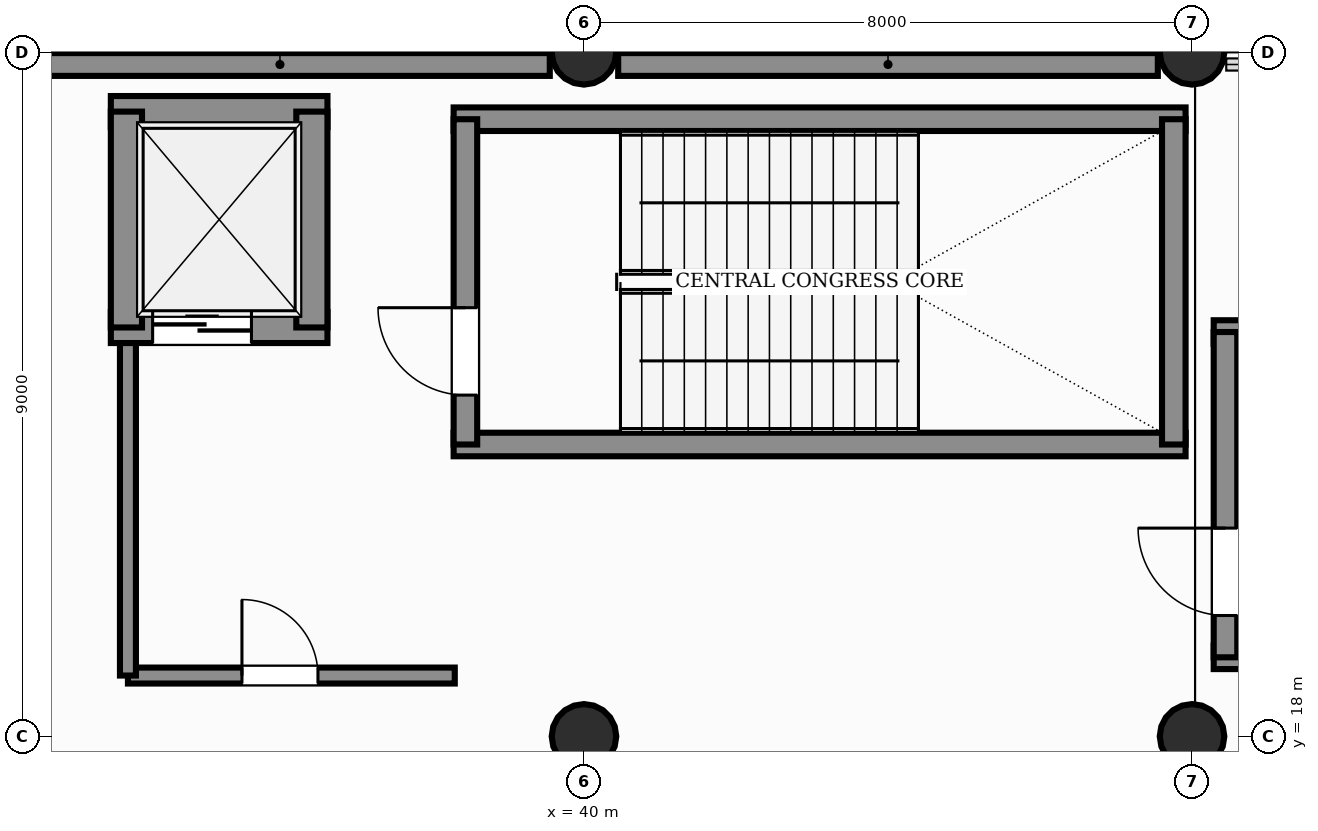
"""IFC4 building model, lengths in metres.
Left out: names, types, materials, properties, quantities, classifications, styles, units other than length and angle.
Written with IfcOpenShell. Run it as: python <this file> out.ifc"""

import sys

from ifc_helpers import new_model, si_unit, direction, frame, frame_2d, origin, origin_2d, place, context, subcontext, project, spatial, rectangle, circle, extrude, element, fill, save


model = new_model("IFC4")
c1 = context("Model", 3, precision=1e-05, world=origin(), true_north=direction((0.0, 1.0)))
c2 = subcontext(c1, "Body", "Model", "MODEL_VIEW")
j1 = project(units=[si_unit("LENGTHUNIT", "METRE"), si_unit("PLANEANGLEUNIT", "RADIAN")], contexts=[c1])
p1 = place(None, origin())
s1 = spatial("IfcSite", under=j1, at=p1, CompositionType="ELEMENT")
p2 = place(p1, origin())
s2 = spatial("IfcBuilding", under=s1, at=p2, CompositionType="ELEMENT")
p3 = place(p2, frame((0.0, 0.0, 6.0)))
s3 = spatial("IfcBuildingStorey", under=s2, at=p3, CompositionType="ELEMENT", Elevation=6.0)
for number, where, z_axis, x_axis in (
    (1, (40.0, 18.0, 0.0), (0.0, 0.0, 1.0), (1.0, 0.0, 0.0)),
    (2, (40.0, 27.0, 0.0), (0.0, 0.0, 1.0), (1.0, 0.0, 0.0)),
    (3, (48.0, 18.0, 0.0), (0.0, 0.0, 1.0), (1.0, 0.0, 0.0)),
    (4, (48.0, 27.0, 0.0), (0.0, 0.0, 1.0), (1.0, 0.0, 0.0)),
):
    element("IfcColumn", number, at=place(p3, frame(where, z_axis=z_axis, x_axis=x_axis)), inside=s3, PredefinedType="COLUMN", context=c2, shape_type="SweptSolid", body=[
        extrude(circle(Radius=0.425, at=origin_2d()), origin(), (0.0, 0.0, 1.0), 5.4),
    ])
for number, where, z_axis, x_axis in (
    (5, (32.45, 26.84, 0.0), (0.0, 0.0, 1.0), (1.0, 0.0, 0.0)),
    (6, (40.45, 26.84, 0.0), (0.0, 0.0, 1.0), (1.0, 0.0, 0.0)),
):
    element("IfcWall", number, at=place(p3, frame(where, z_axis=z_axis, x_axis=x_axis)), inside=s3, PredefinedType="SOLIDWALL", context=c2, shape_type="SweptSolid", body=[
        extrude(rectangle(XDim=7.1, YDim=0.3, at=frame_2d((3.55, 0.0))), origin(), (0.0, 0.0, 1.0), 4.18),
    ])
for number, where, z_axis, x_axis in (
    (7, (38.285, 21.84, 0.0), (0.0, 0.0, 1.0), (1.0, 0.0, 0.0)),
    (8, (38.285, 26.12, 0.0), (0.0, 0.0, 1.0), (1.0, 0.0, 0.0)),
):
    element("IfcWall", number, at=place(p3, frame(where, z_axis=z_axis, x_axis=x_axis)), inside=s3, PredefinedType="SHEAR", context=c2, shape_type="SweptSolid", body=[
        extrude(rectangle(XDim=9.63, YDim=0.31, at=frame_2d((4.815, 0.0))), origin(), (0.0, 0.0, 1.0), 5.4),
    ])
p4 = place(p3, frame((38.44, 21.84, 0.0), z_axis=(0.0, 0.0, 1.0), x_axis=(0.0, 1.0, 0.0)))
e9 = element("IfcWall", 9, at=p4, inside=s3, PredefinedType="SHEAR", context=c2, shape_type="SweptSolid", body=[
    extrude(rectangle(XDim=4.28, YDim=0.31, at=frame_2d((2.14, 0.0))), origin(), (0.0, 0.0, 1.0), 5.4),
])
p5 = place(p4, frame((0.65, 0.0, 0.0)))
e10 = element("IfcOpeningElement", 10, at=p5, cuts=e9, PredefinedType="OPENING", context=c2, shape_type="SweptSolid", body=[
    extrude(rectangle(XDim=1.15, YDim=2.2, at=frame_2d((0.575, 1.1))), frame((0.0, 0.165, 0.0), z_axis=(0.0, -1.0, 0.0), x_axis=(1.0, 0.0, 0.0)), (0.0, 0.0, 1.0), 0.33),
])
p6 = place(p3, frame((47.76, 21.84, 0.0), z_axis=(0.0, 0.0, 1.0), x_axis=(0.0, 1.0, 0.0)))
e11 = element("IfcWall", 11, at=p6, inside=s3, PredefinedType="SHEAR", context=c2, shape_type="SweptSolid", body=[
    extrude(rectangle(XDim=4.28, YDim=0.31, at=frame_2d((2.14, 0.0))), origin(), (0.0, 0.0, 1.0), 5.4),
])
p7 = place(p3, frame((34.0, 18.8, 0.0), z_axis=(0.0, 0.0, 1.0), x_axis=(1.0, 0.0, 0.0)))
e12 = element("IfcWall", 12, at=p7, inside=s3, PredefinedType="PARTITIONING", context=c2, shape_type="SweptSolid", body=[
    extrude(rectangle(XDim=4.3, YDim=0.21, at=frame_2d((2.15, 0.0))), origin(), (0.0, 0.0, 1.0), 3.85),
])
p8 = place(p7, frame((1.5, 0.0, 0.0)))
e13 = element("IfcOpeningElement", 13, at=p8, cuts=e12, PredefinedType="OPENING", context=c2, shape_type="SweptSolid", body=[
    extrude(rectangle(XDim=1.0, YDim=2.15, at=frame_2d((0.5, 1.075))), frame((0.0, 0.115, 0.0), z_axis=(0.0, -1.0, 0.0), x_axis=(1.0, 0.0, 0.0)), (0.0, 0.0, 1.0), 0.23),
])
p9 = place(p3, frame((34.0, 18.8, 0.0), z_axis=(0.0, 0.0, 1.0), x_axis=(0.0, 1.0, 0.0)))
e14 = element("IfcWall", 14, at=p9, inside=s3, PredefinedType="PARTITIONING", context=c2, shape_type="SweptSolid", body=[
    extrude(rectangle(XDim=4.6, YDim=0.21, at=frame_2d((2.3, 0.0))), origin(), (0.0, 0.0, 1.0), 3.85),
])
p10 = place(p3, frame((33.775, 23.38, 0.0), z_axis=(0.0, 0.0, 1.0), x_axis=(1.0, 0.0, 0.0)))
e15 = element("IfcWall", 15, at=p10, inside=s3, PredefinedType="SHEAR", context=c2, shape_type="SweptSolid", body=[
    extrude(rectangle(XDim=2.85, YDim=0.41, at=frame_2d((1.425, 0.0))), origin(), (0.0, 0.0, 1.0), 5.4),
])
p11 = place(p10, frame((0.55, 0.0, 0.0)))
e16 = element("IfcOpeningElement", 16, at=p11, cuts=e15, PredefinedType="OPENING", context=c2, shape_type="SweptSolid", body=[
    extrude(rectangle(XDim=1.3, YDim=2.25, at=frame_2d((0.65, 1.125))), frame((0.0, 0.215, 0.0), z_axis=(0.0, -1.0, 0.0), x_axis=(1.0, 0.0, 0.0)), (0.0, 0.0, 1.0), 0.43),
])
p12 = place(p3, frame((33.775, 26.22, 0.0), z_axis=(0.0, 0.0, 1.0), x_axis=(1.0, 0.0, 0.0)))
e17 = element("IfcWall", 17, at=p12, inside=s3, PredefinedType="SHEAR", context=c2, shape_type="SweptSolid", body=[
    extrude(rectangle(XDim=2.85, YDim=0.41, at=frame_2d((1.425, 0.0))), origin(), (0.0, 0.0, 1.0), 5.4),
])
for number, where, z_axis, x_axis in (
    (18, (33.98, 23.38, 0.0), (0.0, 0.0, 1.0), (0.0, 1.0, 0.0)),
    (19, (36.42, 23.38, 0.0), (0.0, 0.0, 1.0), (0.0, 1.0, 0.0)),
):
    element("IfcWall", number, at=place(p3, frame(where, z_axis=z_axis, x_axis=x_axis)), inside=s3, PredefinedType="SHEAR", context=c2, shape_type="SweptSolid", body=[
        extrude(rectangle(XDim=2.84, YDim=0.41, at=frame_2d((1.42, 0.0))), origin(), (0.0, 0.0, 1.0), 5.4),
    ])
for number, where, z_axis, x_axis in (
    (20, (48.285, 19.04, 0.0), (0.0, 0.0, 1.0), (1.0, 0.0, 0.0)),
    (21, (48.285, 23.32, 0.0), (0.0, 0.0, 1.0), (1.0, 0.0, 0.0)),
):
    element("IfcWall", number, at=place(p3, frame(where, z_axis=z_axis, x_axis=x_axis)), inside=s3, PredefinedType="SHEAR", context=c2, shape_type="SweptSolid", body=[
        extrude(rectangle(XDim=9.63, YDim=0.31, at=frame_2d((4.815, 0.0))), origin(), (0.0, 0.0, 1.0), 5.4),
    ])
p13 = place(p3, frame((48.44, 19.04, 0.0), z_axis=(0.0, 0.0, 1.0), x_axis=(0.0, 1.0, 0.0)))
e22 = element("IfcWall", 22, at=p13, inside=s3, PredefinedType="SHEAR", context=c2, shape_type="SweptSolid", body=[
    extrude(rectangle(XDim=4.28, YDim=0.31, at=frame_2d((2.14, 0.0))), origin(), (0.0, 0.0, 1.0), 5.4),
])
p14 = place(p13, frame((0.55, 0.0, 0.0)))
e23 = element("IfcOpeningElement", 23, at=p14, cuts=e22, PredefinedType="OPENING", context=c2, shape_type="SweptSolid", body=[
    extrude(rectangle(XDim=1.15, YDim=2.2, at=frame_2d((0.575, 1.1))), frame((0.0, 0.165, 0.0), z_axis=(0.0, -1.0, 0.0), x_axis=(1.0, 0.0, 0.0)), (0.0, 0.0, 1.0), 0.33),
])
p15 = place(p5, origin())
e24 = element("IfcDoor", 24, at=p15, inside=s3, OperationType="SINGLE_SWING_RIGHT", PredefinedType="DOOR", context=c2, shape_type="SweptSolid", body=[
    extrude(rectangle(XDim=1.15, YDim=2.2, at=frame_2d((0.575, 1.1))), frame((0.0, 0.025, 0.0), z_axis=(0.0, -1.0, 0.0), x_axis=(1.0, 0.0, 0.0)), (0.0, 0.0, 1.0), 0.05),
])
fill(e10, e24)
p16 = place(p8, origin())
e25 = element("IfcDoor", 25, at=p16, inside=s3, OperationType="SINGLE_SWING_LEFT", PredefinedType="DOOR", context=c2, shape_type="SweptSolid", body=[
    extrude(rectangle(XDim=1.0, YDim=2.15, at=frame_2d((0.5, 1.075))), frame((0.0, 0.025, 0.0), z_axis=(0.0, -1.0, 0.0), x_axis=(1.0, 0.0, 0.0)), (0.0, 0.0, 1.0), 0.05),
])
fill(e13, e25)
p17 = place(p11, origin())
e26 = element("IfcDoor", 26, at=p17, inside=s3, OperationType="DOUBLE_DOOR_SLIDING", PredefinedType="DOOR", context=c2, shape_type="SweptSolid", body=[
    extrude(rectangle(XDim=1.3, YDim=2.25, at=frame_2d((0.65, 1.125))), frame((0.0, 0.025, 0.0), z_axis=(0.0, -1.0, 0.0), x_axis=(1.0, 0.0, 0.0)), (0.0, 0.0, 1.0), 0.05),
])
fill(e16, e26)
p18 = place(p14, origin())
e27 = element("IfcDoor", 27, at=p18, inside=s3, OperationType="SINGLE_SWING_RIGHT", PredefinedType="DOOR", context=c2, shape_type="SweptSolid", body=[
    extrude(rectangle(XDim=1.15, YDim=2.2, at=frame_2d((0.575, 1.1))), frame((0.0, 0.025, 0.0), z_axis=(0.0, -1.0, 0.0), x_axis=(1.0, 0.0, 0.0)), (0.0, 0.0, 1.0), 0.05),
])
fill(e23, e27)
save(model, sys.argv[1])
